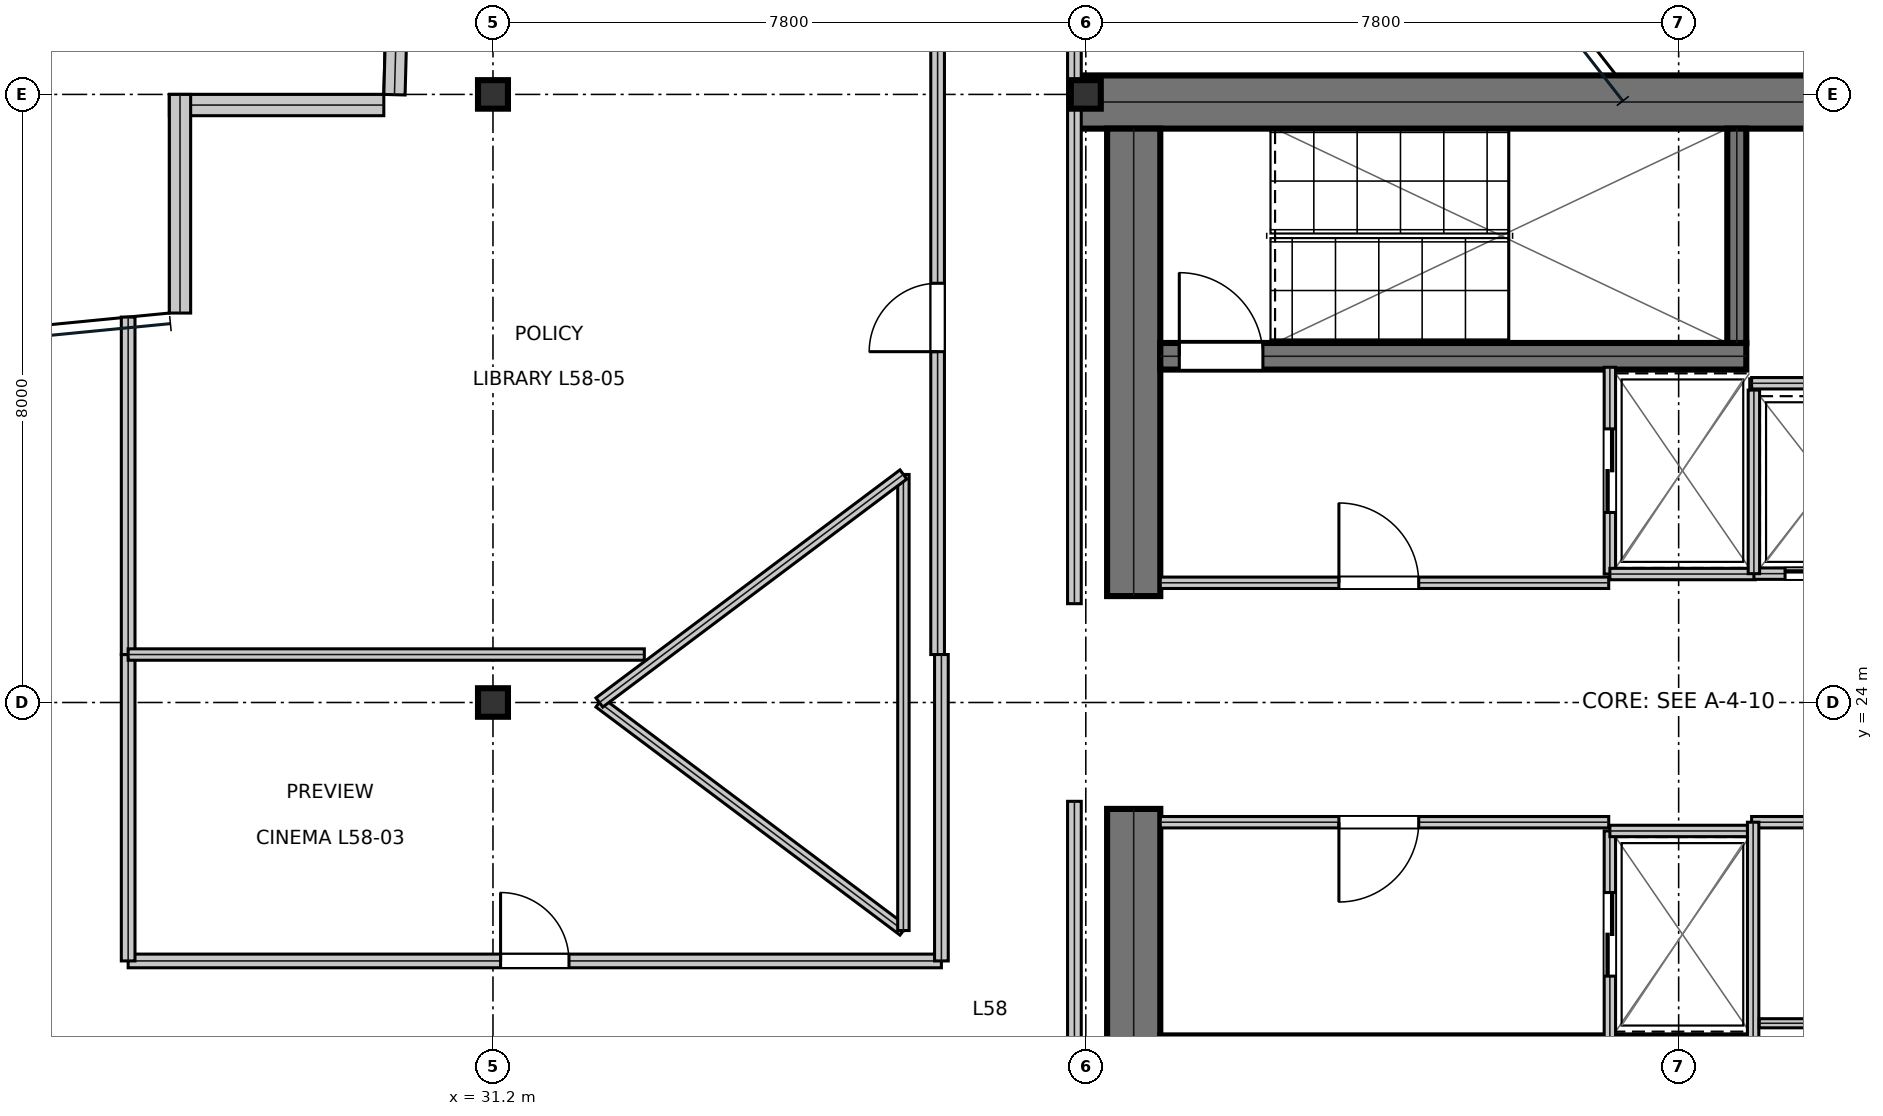
"""IFC4 building model, lengths in metres.
Left out: names, types, materials, properties, quantities, classifications, styles, units other than length and angle.
Written with IfcOpenShell. Run it as: python <this file> out.ifc"""

import sys

from ifc_helpers import new_model, si_unit, direction, frame, frame_2d, origin, origin_2d, place, context, subcontext, project, spatial, rectangle, i_section, extrude, element, fill, save


model = new_model("IFC4")
c1 = context("Model", 3, precision=1e-05, world=origin(), true_north=direction((0.0, 1.0)))
c2 = subcontext(c1, "Body", "Model", "MODEL_VIEW")
j1 = project(units=[si_unit("LENGTHUNIT", "METRE"), si_unit("PLANEANGLEUNIT", "RADIAN")], contexts=[c1])
p1 = place(None, origin())
s1 = spatial("IfcSite", under=j1, at=p1, CompositionType="ELEMENT")
p2 = place(p1, origin())
s2 = spatial("IfcBuilding", under=s1, at=p2, CompositionType="ELEMENT")
p3 = place(p2, frame((0.0, 0.0, 248.55)))
s3 = spatial("IfcBuildingStorey", under=s2, at=p3, CompositionType="ELEMENT", Elevation=248.55)
p4 = place(p3, frame((38.8, 31.9, 0.0), z_axis=(0.0, 0.0, 1.0), x_axis=(1.0, 0.0, 0.0)))
e1 = element("IfcWall", 1, at=p4, inside=s3, PredefinedType="SHEAR", context=c2, shape_type="SweptSolid", body=[
    extrude(rectangle(XDim=16.0, YDim=0.7, at=frame_2d((8.0, 0.0))), origin(), (0.0, 0.0, 1.0), 3.79),
])
for number, where, z_axis, x_axis in (
    (2, (39.63, 16.45, 0.0), (0.0, 0.0, 1.0), (0.0, 1.0, 0.0)),
    (3, (39.63, 25.4, 0.0), (0.0, 0.0, 1.0), (0.0, 1.0, 0.0)),
):
    element("IfcWall", number, at=place(p3, frame(where, z_axis=z_axis, x_axis=x_axis)), inside=s3, PredefinedType="SHEAR", context=c2, shape_type="SweptSolid", body=[
        extrude(rectangle(XDim=6.15, YDim=0.7, at=frame_2d((3.075, 0.0))), origin(), (0.0, 0.0, 1.0), 3.79),
    ])
p5 = place(p3, frame((39.98, 28.555, 0.0), z_axis=(0.0, 0.0, 1.0), x_axis=(1.0, 0.0, 0.0)))
e4 = element("IfcWall", 4, at=p5, inside=s3, PredefinedType="SHEAR", context=c2, shape_type="SweptSolid", body=[
    extrude(rectangle(XDim=7.71, YDim=0.35, at=frame_2d((3.855, 0.0))), origin(), (0.0, 0.0, 1.0), 3.79),
])
p6 = place(p5, frame((0.25, 0.0, 0.0)))
e5 = element("IfcOpeningElement", 5, at=p6, cuts=e4, PredefinedType="OPENING", context=c2, shape_type="SweptSolid", body=[
    extrude(rectangle(XDim=1.1, YDim=2.15, at=frame_2d((0.55, 1.075))), frame((0.0, 0.185, 0.0), z_axis=(0.0, -1.0, 0.0), x_axis=(1.0, 0.0, 0.0)), (0.0, 0.0, 1.0), 0.37),
])
p7 = place(p3, frame((39.98, 19.445, 0.0), z_axis=(0.0, 0.0, 1.0), x_axis=(1.0, 0.0, 0.0)))
e6 = element("IfcWall", 6, at=p7, inside=s3, PredefinedType="SHEAR", context=c2, shape_type="SweptSolid", body=[
    extrude(rectangle(XDim=7.71, YDim=0.35, at=frame_2d((3.855, 0.0))), origin(), (0.0, 0.0, 1.0), 3.79),
])
p8 = place(p7, frame((0.25, 0.0, 0.0)))
e7 = element("IfcOpeningElement", 7, at=p8, cuts=e6, PredefinedType="OPENING", context=c2, shape_type="SweptSolid", body=[
    extrude(rectangle(XDim=1.1, YDim=2.15, at=frame_2d((0.55, 1.075))), frame((0.0, 0.185, 0.0), z_axis=(0.0, -1.0, 0.0), x_axis=(1.0, 0.0, 0.0)), (0.0, 0.0, 1.0), 0.37),
])
p9 = place(p3, frame((47.565, 28.73, 0.0), z_axis=(0.0, 0.0, 1.0), x_axis=(0.0, 1.0, 0.0)))
e8 = element("IfcWall", 8, at=p9, inside=s3, PredefinedType="SHEAR", context=c2, shape_type="SweptSolid", body=[
    extrude(rectangle(XDim=2.82, YDim=0.25, at=frame_2d((1.41, 0.0))), origin(), (0.0, 0.0, 1.0), 3.79),
])
for number, where, z_axis, x_axis in (
    (9, (31.2, 24.0, 0.0), (0.0, 0.0, 1.0), (1.0, 0.0, 0.0)),
    (10, (31.2, 32.0, 0.0), (0.0, 0.0, 1.0), (1.0, 0.0, 0.0)),
    (11, (39.0, 32.0, 0.0), (0.0, 0.0, 1.0), (1.0, 0.0, 0.0)),
):
    element("IfcColumn", number, at=place(p3, frame(where, z_axis=z_axis, x_axis=x_axis)), inside=s3, PredefinedType="COLUMN", context=c2, shape_type="SweptSolid", body=[
        extrude(i_section(OverallWidth=0.394, OverallDepth=0.375, WebThickness=0.017, FlangeThickness=0.028, at=origin_2d()), origin(), (0.0, 0.0, 1.0), 4.044),
    ])
p10 = place(p3, frame((30.083, 38.723, 0.0), z_axis=(0.0, 0.0, 1.0), x_axis=(-0.026702629768, -0.999643421208, 0.0)))
e12 = element("IfcWall", 12, at=p10, inside=s3, PredefinedType="STANDARD", context=c2, shape_type="SweptSolid", body=[
    extrude(rectangle(XDim=6.729, YDim=0.28, at=frame_2d((3.365, 0.0))), origin(), (0.0, 0.0, 1.0), 3.79),
])
p11 = place(p3, frame((29.764, 31.86, 0.0), z_axis=(0.0, 0.0, 1.0), x_axis=(-1.0, 0.0, 0.0)))
e13 = element("IfcWall", 13, at=p11, inside=s3, PredefinedType="STANDARD", context=c2, shape_type="SweptSolid", body=[
    extrude(rectangle(XDim=2.822, YDim=0.28, at=frame_2d((1.411, 0.0))), origin(), (0.0, 0.0, 1.0), 3.79),
])
p12 = place(p3, frame((27.083, 32.0, 0.0), z_axis=(0.0, 0.0, 1.0), x_axis=(0.0, -1.0, 0.0)))
e14 = element("IfcWall", 14, at=p12, inside=s3, PredefinedType="STANDARD", context=c2, shape_type="SweptSolid", body=[
    extrude(rectangle(XDim=2.876, YDim=0.28, at=frame_2d((1.438, 0.0))), origin(), (0.0, 0.0, 1.0), 3.319),
])
p13 = place(p3, frame((39.98, 25.575, 0.0), z_axis=(0.0, 0.0, 1.0), x_axis=(1.0, 0.0, 0.0)))
e15 = element("IfcWall", 15, at=p13, inside=s3, PredefinedType="PARTITIONING", context=c2, shape_type="SweptSolid", body=[
    extrude(rectangle(XDim=5.9, YDim=0.15, at=frame_2d((2.95, 0.0))), origin(), (0.0, 0.0, 1.0), 3.79),
])
p14 = place(p13, frame((2.35, 0.0, 0.0)))
e16 = element("IfcOpeningElement", 16, at=p14, cuts=e15, PredefinedType="OPENING", context=c2, shape_type="SweptSolid", body=[
    extrude(rectangle(XDim=1.05, YDim=2.15, at=frame_2d((0.525, 1.075))), frame((0.0, 0.085, 0.0), z_axis=(0.0, -1.0, 0.0), x_axis=(1.0, 0.0, 0.0)), (0.0, 0.0, 1.0), 0.17),
])
p15 = place(p3, frame((39.98, 22.425, 0.0), z_axis=(0.0, 0.0, 1.0), x_axis=(1.0, 0.0, 0.0)))
e17 = element("IfcWall", 17, at=p15, inside=s3, PredefinedType="PARTITIONING", context=c2, shape_type="SweptSolid", body=[
    extrude(rectangle(XDim=5.9, YDim=0.15, at=frame_2d((2.95, 0.0))), origin(), (0.0, 0.0, 1.0), 3.79),
])
p16 = place(p15, frame((2.35, 0.0, 0.0)))
e18 = element("IfcOpeningElement", 18, at=p16, cuts=e17, PredefinedType="OPENING", context=c2, shape_type="SweptSolid", body=[
    extrude(rectangle(XDim=1.05, YDim=2.15, at=frame_2d((0.525, 1.075))), frame((0.0, 0.085, 0.0), z_axis=(0.0, -1.0, 0.0), x_axis=(1.0, 0.0, 0.0)), (0.0, 0.0, 1.0), 0.17),
])
p17 = place(p3, frame((45.895, 25.69, 0.0), z_axis=(0.0, 0.0, 1.0), x_axis=(0.0, 1.0, 0.0)))
e19 = element("IfcWall", 19, at=p17, inside=s3, PredefinedType="PARTITIONING", context=c2, shape_type="SweptSolid", body=[
    extrude(rectangle(XDim=2.72, YDim=0.15, at=frame_2d((1.36, 0.0))), origin(), (0.0, 0.0, 1.0), 3.79),
])
p18 = place(p17, frame((0.81, 0.0, 0.0)))
e20 = element("IfcOpeningElement", 20, at=p18, cuts=e19, PredefinedType="OPENING", context=c2, shape_type="SweptSolid", body=[
    extrude(rectangle(XDim=1.1, YDim=2.15, at=frame_2d((0.55, 1.075))), frame((0.0, 0.085, 0.0), z_axis=(0.0, -1.0, 0.0), x_axis=(1.0, 0.0, 0.0)), (0.0, 0.0, 1.0), 0.17),
])
p19 = place(p3, frame((45.895, 25.69, 0.0), z_axis=(0.0, 0.0, 1.0), x_axis=(1.0, 0.0, 0.0)))
e21 = element("IfcWall", 21, at=p19, inside=s3, PredefinedType="PARTITIONING", context=c2, shape_type="SweptSolid", body=[
    extrude(rectangle(XDim=1.915, YDim=0.15, at=frame_2d((0.958, 0.0))), origin(), (0.0, 0.0, 1.0), 3.79),
])
p20 = place(p3, frame((45.895, 19.59, 0.0), z_axis=(0.0, 0.0, 1.0), x_axis=(0.0, 1.0, 0.0)))
e22 = element("IfcWall", 22, at=p20, inside=s3, PredefinedType="PARTITIONING", context=c2, shape_type="SweptSolid", body=[
    extrude(rectangle(XDim=2.72, YDim=0.15, at=frame_2d((1.36, 0.0))), origin(), (0.0, 0.0, 1.0), 3.79),
])
p21 = place(p20, frame((0.81, 0.0, 0.0)))
e23 = element("IfcOpeningElement", 23, at=p21, cuts=e22, PredefinedType="OPENING", context=c2, shape_type="SweptSolid", body=[
    extrude(rectangle(XDim=1.1, YDim=2.15, at=frame_2d((0.55, 1.075))), frame((0.0, 0.085, 0.0), z_axis=(0.0, -1.0, 0.0), x_axis=(1.0, 0.0, 0.0)), (0.0, 0.0, 1.0), 0.17),
])
p22 = place(p3, frame((45.895, 22.31, 0.0), z_axis=(0.0, 0.0, 1.0), x_axis=(1.0, 0.0, 0.0)))
e24 = element("IfcWall", 24, at=p22, inside=s3, PredefinedType="PARTITIONING", context=c2, shape_type="SweptSolid", body=[
    extrude(rectangle(XDim=1.915, YDim=0.15, at=frame_2d((0.958, 0.0))), origin(), (0.0, 0.0, 1.0), 3.79),
])
p23 = place(p3, frame((47.79, 25.695, 0.0), z_axis=(0.0, 0.0, 1.0), x_axis=(1.0, 0.0, 0.0)))
e25 = element("IfcWall", 25, at=p23, inside=s3, PredefinedType="PARTITIONING", context=c2, shape_type="SweptSolid", body=[
    extrude(rectangle(XDim=1.92, YDim=0.15, at=frame_2d((0.96, 0.0))), origin(), (0.0, 0.0, 1.0), 3.79),
])
p24 = place(p23, frame((0.41, 0.0, 0.0)))
e26 = element("IfcOpeningElement", 26, at=p24, cuts=e25, PredefinedType="OPENING", context=c2, shape_type="SweptSolid", body=[
    extrude(rectangle(XDim=1.1, YDim=2.15, at=frame_2d((0.55, 1.075))), frame((0.0, 0.085, 0.0), z_axis=(0.0, -1.0, 0.0), x_axis=(1.0, 0.0, 0.0)), (0.0, 0.0, 1.0), 0.17),
])
p25 = place(p3, frame((47.79, 25.695, 0.0), z_axis=(0.0, 0.0, 1.0), x_axis=(0.0, 1.0, 0.0)))
e27 = element("IfcWall", 27, at=p25, inside=s3, PredefinedType="PARTITIONING", context=c2, shape_type="SweptSolid", body=[
    extrude(rectangle(XDim=2.415, YDim=0.15, at=frame_2d((1.208, 0.0))), origin(), (0.0, 0.0, 1.0), 3.79),
])
p26 = place(p3, frame((47.76, 22.425, 0.0), z_axis=(0.0, 0.0, 1.0), x_axis=(1.0, 0.0, 0.0)))
e28 = element("IfcWall", 28, at=p26, inside=s3, PredefinedType="PARTITIONING", context=c2, shape_type="SweptSolid", body=[
    extrude(rectangle(XDim=1.96, YDim=0.15, at=frame_2d((0.98, 0.0))), origin(), (0.0, 0.0, 1.0), 3.79),
])
p27 = place(p3, frame((47.78, 16.45, 0.0), z_axis=(0.0, 0.0, 1.0), x_axis=(0.0, 1.0, 0.0)))
e29 = element("IfcWall", 29, at=p27, inside=s3, PredefinedType="PARTITIONING", context=c2, shape_type="SweptSolid", body=[
    extrude(rectangle(XDim=5.975, YDim=0.15, at=frame_2d((2.988, 0.0))), origin(), (0.0, 0.0, 1.0), 3.79),
])
p28 = place(p3, frame((47.86, 19.78, 0.0), z_axis=(0.0, 0.0, 1.0), x_axis=(1.0, 0.0, 0.0)))
e30 = element("IfcWall", 30, at=p28, inside=s3, PredefinedType="PARTITIONING", context=c2, shape_type="SweptSolid", body=[
    extrude(rectangle(XDim=1.76, YDim=0.12, at=frame_2d((0.88, 0.0))), origin(), (0.0, 0.0, 1.0), 3.79),
])
p29 = place(p3, frame((47.76, 28.2, 0.0), z_axis=(0.0, 0.0, 1.0), x_axis=(1.0, 0.0, 0.0)))
e31 = element("IfcWall", 31, at=p29, inside=s3, PredefinedType="PARTITIONING", context=c2, shape_type="SweptSolid", body=[
    extrude(rectangle(XDim=2.04, YDim=0.15, at=frame_2d((1.02, 0.0))), origin(), (0.0, 0.0, 1.0), 3.79),
])
p30 = place(p3, frame((26.4, 20.6, 0.0), z_axis=(0.0, 0.0, 1.0), x_axis=(1.0, 0.0, 0.0)))
e32 = element("IfcWall", 32, at=p30, inside=s3, PredefinedType="SOLIDWALL", context=c2, shape_type="SweptSolid", body=[
    extrude(rectangle(XDim=10.7, YDim=0.18, at=frame_2d((5.35, 0.0))), origin(), (0.0, 0.0, 1.0), 3.241),
])
p31 = place(p30, frame((4.9, 0.0, 0.0)))
e33 = element("IfcOpeningElement", 33, at=p31, cuts=e32, PredefinedType="OPENING", context=c2, shape_type="SweptSolid", body=[
    extrude(rectangle(XDim=0.9, YDim=2.15, at=frame_2d((0.45, 1.075))), frame((0.0, 0.1, 0.0), z_axis=(0.0, -1.0, 0.0), x_axis=(1.0, 0.0, 0.0)), (0.0, 0.0, 1.0), 0.2),
])
p32 = place(p3, frame((37.05, 24.631, 0.0), z_axis=(0.0, 0.0, 1.0), x_axis=(0.0, 1.0, 0.0)))
e34 = element("IfcWall", 34, at=p32, inside=s3, PredefinedType="SOLIDWALL", context=c2, shape_type="SweptSolid", body=[
    extrude(rectangle(XDim=8.869, YDim=0.18, at=frame_2d((4.435, 0.0))), origin(), (0.0, 0.0, 1.0), 3.241),
])
p33 = place(p32, frame((3.985, 0.0, 0.0)))
e35 = element("IfcOpeningElement", 35, at=p33, cuts=e34, PredefinedType="OPENING", context=c2, shape_type="SweptSolid", body=[
    extrude(rectangle(XDim=0.9, YDim=2.15, at=frame_2d((0.45, 1.075))), frame((0.0, 0.1, 0.0), z_axis=(0.0, -1.0, 0.0), x_axis=(1.0, 0.0, 0.0)), (0.0, 0.0, 1.0), 0.2),
])
p34 = place(p3, frame((38.85, 14.5, 0.0), z_axis=(0.0, 0.0, 1.0), x_axis=(0.0, 1.0, 0.0)))
e36 = element("IfcWall", 36, at=p34, inside=s3, PredefinedType="SOLIDWALL", context=c2, shape_type="SweptSolid", body=[
    extrude(rectangle(XDim=8.2, YDim=0.18, at=frame_2d((4.1, 0.0))), origin(), (0.0, 0.0, 1.0), 3.241),
])
p35 = place(p3, frame((26.4, 20.6, 0.0), z_axis=(0.0, 0.0, 1.0), x_axis=(0.0, 1.0, 0.0)))
e37 = element("IfcWall", 37, at=p35, inside=s3, PredefinedType="SOLIDWALL", context=c2, shape_type="SweptSolid", body=[
    extrude(rectangle(XDim=4.031, YDim=0.18, at=frame_2d((2.016, 0.0))), origin(), (0.0, 0.0, 1.0), 3.241),
])
p36 = place(p3, frame((37.1, 20.6, 0.0), z_axis=(0.0, 0.0, 1.0), x_axis=(0.0, 1.0, 0.0)))
e38 = element("IfcWall", 38, at=p36, inside=s3, PredefinedType="SOLIDWALL", context=c2, shape_type="SweptSolid", body=[
    extrude(rectangle(XDim=4.031, YDim=0.18, at=frame_2d((2.016, 0.0))), origin(), (0.0, 0.0, 1.0), 3.79),
])
p37 = place(p3, frame((38.85, 25.3, 0.0), z_axis=(0.0, 0.0, 1.0), x_axis=(0.0, 1.0, 0.0)))
e39 = element("IfcWall", 39, at=p37, inside=s3, PredefinedType="SOLIDWALL", context=c2, shape_type="SweptSolid", body=[
    extrude(rectangle(XDim=8.2, YDim=0.18, at=frame_2d((4.1, 0.0))), origin(), (0.0, 0.0, 1.0), 3.241),
])
p38 = place(p3, frame((26.4, 24.631, 0.0), z_axis=(0.0, 0.0, 1.0), x_axis=(0.0, 1.0, 0.0)))
e40 = element("IfcWall", 40, at=p38, inside=s3, PredefinedType="SOLIDWALL", context=c2, shape_type="SweptSolid", body=[
    extrude(rectangle(XDim=4.44, YDim=0.18, at=frame_2d((2.22, 0.0))), origin(), (0.0, 0.0, 1.0), 3.241),
])
p39 = place(p3, frame((26.4, 24.631, 0.0), z_axis=(0.0, 0.0, 1.0), x_axis=(1.0, 0.0, 0.0)))
e41 = element("IfcWall", 41, at=p39, inside=s3, PredefinedType="MOVABLE", context=c2, shape_type="SweptSolid", body=[
    extrude(rectangle(XDim=6.792, YDim=0.15, at=frame_2d((3.396, 0.0))), origin(), (0.0, 0.0, 1.0), 3.241),
])
p40 = place(p3, frame((32.6, 24.0, 0.0), z_axis=(0.0, 0.0, 1.0), x_axis=(0.8, -0.6, 0.0)))
e42 = element("IfcWall", 42, at=p40, inside=s3, PredefinedType="MOVABLE", context=c2, shape_type="SweptSolid", body=[
    extrude(rectangle(XDim=5.0, YDim=0.15, at=frame_2d((2.5, 0.0))), origin(), (0.0, 0.0, 1.0), 3.79),
])
p41 = place(p3, frame((36.6, 21.0, 0.0), z_axis=(0.0, 0.0, 1.0), x_axis=(0.0, 1.0, 0.0)))
e43 = element("IfcWall", 43, at=p41, inside=s3, PredefinedType="MOVABLE", context=c2, shape_type="SweptSolid", body=[
    extrude(rectangle(XDim=6.0, YDim=0.15, at=frame_2d((3.0, 0.0))), origin(), (0.0, 0.0, 1.0), 3.79),
])
p42 = place(p3, frame((36.6, 27.0, 0.0), z_axis=(0.0, 0.0, 1.0), x_axis=(-0.8, -0.6, 0.0)))
e44 = element("IfcWall", 44, at=p42, inside=s3, PredefinedType="MOVABLE", context=c2, shape_type="SweptSolid", body=[
    extrude(rectangle(XDim=5.0, YDim=0.15, at=frame_2d((2.5, 0.0))), origin(), (0.0, 0.0, 1.0), 3.79),
])
p43 = place(p14, origin())
e45 = element("IfcDoor", 45, at=p43, inside=s3, OperationType="SINGLE_SWING_LEFT", PredefinedType="DOOR", context=c2, shape_type="SweptSolid", body=[
    extrude(rectangle(XDim=1.05, YDim=2.15, at=frame_2d((0.525, 1.075))), frame((0.0, 0.025, 0.0), z_axis=(0.0, -1.0, 0.0), x_axis=(1.0, 0.0, 0.0)), (0.0, 0.0, 1.0), 0.05),
])
fill(e16, e45)
p44 = place(p16, frame((1.05, 0.0, 0.0), z_axis=(0.0, 0.0, 1.0), x_axis=(-1.0, 0.0, 0.0)))
e46 = element("IfcDoor", 46, at=p44, inside=s3, OperationType="SINGLE_SWING_RIGHT", PredefinedType="DOOR", context=c2, shape_type="SweptSolid", body=[
    extrude(rectangle(XDim=1.05, YDim=2.15, at=frame_2d((0.525, 1.075))), frame((0.0, 0.025, 0.0), z_axis=(0.0, -1.0, 0.0), x_axis=(1.0, 0.0, 0.0)), (0.0, 0.0, 1.0), 0.05),
])
fill(e18, e46)
p45 = place(p18, frame((1.1, 0.0, 0.0), z_axis=(0.0, 0.0, 1.0), x_axis=(-1.0, 0.0, 0.0)))
e47 = element("IfcDoor", 47, at=p45, inside=s3, OperationType="DOUBLE_DOOR_SLIDING", PredefinedType="DOOR", context=c2, shape_type="SweptSolid", body=[
    extrude(rectangle(XDim=1.1, YDim=2.15, at=frame_2d((0.55, 1.075))), frame((0.0, 0.025, 0.0), z_axis=(0.0, -1.0, 0.0), x_axis=(1.0, 0.0, 0.0)), (0.0, 0.0, 1.0), 0.05),
])
fill(e20, e47)
p46 = place(p21, frame((1.1, 0.0, 0.0), z_axis=(0.0, 0.0, 1.0), x_axis=(-1.0, 0.0, 0.0)))
e48 = element("IfcDoor", 48, at=p46, inside=s3, OperationType="DOUBLE_DOOR_SLIDING", PredefinedType="DOOR", context=c2, shape_type="SweptSolid", body=[
    extrude(rectangle(XDim=1.1, YDim=2.15, at=frame_2d((0.55, 1.075))), frame((0.0, 0.025, 0.0), z_axis=(0.0, -1.0, 0.0), x_axis=(1.0, 0.0, 0.0)), (0.0, 0.0, 1.0), 0.05),
])
fill(e23, e48)
p47 = place(p24, frame((1.1, 0.0, 0.0), z_axis=(0.0, 0.0, 1.0), x_axis=(-1.0, 0.0, 0.0)))
e49 = element("IfcDoor", 49, at=p47, inside=s3, OperationType="DOUBLE_DOOR_SLIDING", PredefinedType="DOOR", context=c2, shape_type="SweptSolid", body=[
    extrude(rectangle(XDim=1.1, YDim=2.15, at=frame_2d((0.55, 1.075))), frame((0.0, 0.025, 0.0), z_axis=(0.0, -1.0, 0.0), x_axis=(1.0, 0.0, 0.0)), (0.0, 0.0, 1.0), 0.05),
])
fill(e26, e49)
p48 = place(p31, origin())
e50 = element("IfcDoor", 50, at=p48, inside=s3, OperationType="SINGLE_SWING_LEFT", PredefinedType="DOOR", context=c2, shape_type="SweptSolid", body=[
    extrude(rectangle(XDim=0.9, YDim=2.15, at=frame_2d((0.45, 1.075))), frame((0.0, 0.025, 0.0), z_axis=(0.0, -1.0, 0.0), x_axis=(1.0, 0.0, 0.0)), (0.0, 0.0, 1.0), 0.05),
])
fill(e33, e50)
p49 = place(p33, origin())
e51 = element("IfcDoor", 51, at=p49, inside=s3, OperationType="SINGLE_SWING_LEFT", PredefinedType="DOOR", context=c2, shape_type="SweptSolid", body=[
    extrude(rectangle(XDim=0.9, YDim=2.15, at=frame_2d((0.45, 1.075))), frame((0.0, 0.025, 0.0), z_axis=(0.0, -1.0, 0.0), x_axis=(1.0, 0.0, 0.0)), (0.0, 0.0, 1.0), 0.05),
])
fill(e35, e51)
p50 = place(p6, origin())
e52 = element("IfcDoor", 52, at=p50, inside=s3, OperationType="SINGLE_SWING_LEFT", PredefinedType="DOOR", context=c2, shape_type="SweptSolid", body=[
    extrude(rectangle(XDim=1.1, YDim=2.15, at=frame_2d((0.55, 1.075))), frame((0.0, 0.025, 0.0), z_axis=(0.0, -1.0, 0.0), x_axis=(1.0, 0.0, 0.0)), (0.0, 0.0, 1.0), 0.05),
])
fill(e5, e52)
save(model, sys.argv[1])
